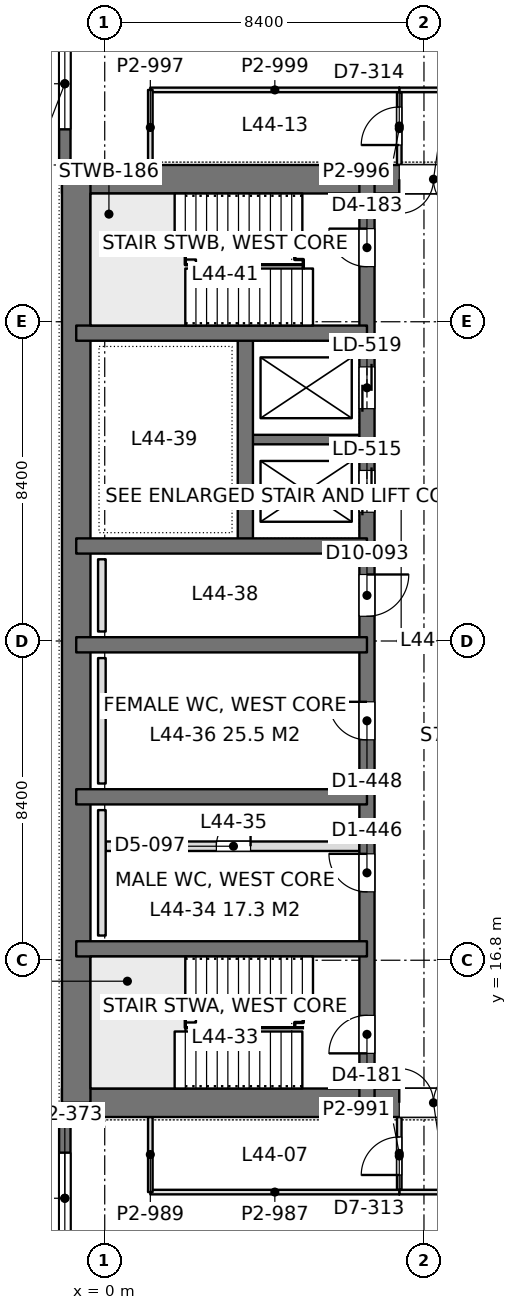
"""IFC4 building model, lengths in metres.
Left out: names, types, materials, properties, quantities, classifications, styles, units other than length and angle.
Written with IfcOpenShell. Run it as: python <this file> out.ifc"""

import sys

from ifc_helpers import new_model, si_unit, direction, frame, frame_2d, origin, place, context, subcontext, project, spatial, rectangle, extrude, element, fill, save


model = new_model("IFC4")
c1 = context("Model", 3, precision=1e-05, world=origin(), true_north=direction((0.0, 1.0)))
c2 = subcontext(c1, "Body", "Model", "MODEL_VIEW")
j1 = project(units=[si_unit("LENGTHUNIT", "METRE"), si_unit("PLANEANGLEUNIT", "RADIAN")], contexts=[c1])
p1 = place(None, origin())
s1 = spatial("IfcSite", under=j1, at=p1, CompositionType="ELEMENT")
p2 = place(p1, origin())
s2 = spatial("IfcBuilding", under=s1, at=p2, CompositionType="ELEMENT")
p3 = place(p2, frame((0.0, 0.0, 194.4)))
s3 = spatial("IfcBuildingStorey", under=s2, at=p3, CompositionType="ELEMENT", Elevation=194.4)
p4 = place(p3, frame((-1.125, 13.05, 0.0), z_axis=(0.0, 0.0, 1.0), x_axis=(1.0, 0.0, 0.0)))
e1 = element("IfcWall", 1, at=p4, inside=s3, PredefinedType="SHEAR", context=c2, shape_type="SweptSolid", body=[
    extrude(rectangle(XDim=17.85, YDim=0.75, at=frame_2d((8.925, 0.0))), origin(), (0.0, 0.0, 1.0), 4.2),
])
p5 = place(p4, frame((8.875, 0.0, 0.0)))
e2 = element("IfcOpeningElement", 2, at=p5, cuts=e1, PredefinedType="OPENING", context=c2, shape_type="SweptSolid", body=[
    extrude(rectangle(XDim=1.8, YDim=2.4, at=frame_2d((0.9, 1.2))), frame((0.0, 0.385, 0.0), z_axis=(0.0, -1.0, 0.0), x_axis=(1.0, 0.0, 0.0)), (0.0, 0.0, 1.0), 0.77),
])
p6 = place(p3, frame((-1.125, 37.35, 0.0), z_axis=(0.0, 0.0, 1.0), x_axis=(1.0, 0.0, 0.0)))
e3 = element("IfcWall", 3, at=p6, inside=s3, PredefinedType="SHEAR", context=c2, shape_type="SweptSolid", body=[
    extrude(rectangle(XDim=17.85, YDim=0.75, at=frame_2d((8.925, 0.0))), origin(), (0.0, 0.0, 1.0), 4.2),
])
p7 = place(p6, frame((8.875, 0.0, 0.0)))
e4 = element("IfcOpeningElement", 4, at=p7, cuts=e3, PredefinedType="OPENING", context=c2, shape_type="SweptSolid", body=[
    extrude(rectangle(XDim=1.8, YDim=2.4, at=frame_2d((0.9, 1.2))), frame((0.0, 0.385, 0.0), z_axis=(0.0, -1.0, 0.0), x_axis=(1.0, 0.0, 0.0)), (0.0, 0.0, 1.0), 0.77),
])
p8 = place(p3, frame((-0.75, 13.05, 0.0), z_axis=(0.0, 0.0, 1.0), x_axis=(0.0, 1.0, 0.0)))
e5 = element("IfcWall", 5, at=p8, inside=s3, PredefinedType="SHEAR", context=c2, shape_type="SweptSolid", body=[
    extrude(rectangle(XDim=24.3, YDim=0.75, at=frame_2d((12.15, 0.0))), origin(), (0.0, 0.0, 1.0), 4.2),
])
p9 = place(p3, frame((6.9, 13.05, 0.0), z_axis=(0.0, 0.0, 1.0), x_axis=(0.0, 1.0, 0.0)))
e6 = element("IfcWall", 6, at=p9, inside=s3, PredefinedType="SHEAR", context=c2, shape_type="SweptSolid", body=[
    extrude(rectangle(XDim=24.3, YDim=0.4, at=frame_2d((12.15, 0.0))), origin(), (0.0, 0.0, 1.0), 4.2),
])
p10 = place(p9, frame((1.3, 0.0, 0.0)))
e7 = element("IfcOpeningElement", 7, at=p10, cuts=e6, PredefinedType="OPENING", context=c2, shape_type="SweptSolid", body=[
    extrude(rectangle(XDim=1.0, YDim=2.2, at=frame_2d((0.5, 1.1))), frame((0.0, 0.21, 0.0), z_axis=(0.0, -1.0, 0.0), x_axis=(1.0, 0.0, 0.0)), (0.0, 0.0, 1.0), 0.42),
])
p11 = place(p9, frame((22.0, 0.0, 0.0)))
e8 = element("IfcOpeningElement", 8, at=p11, cuts=e6, PredefinedType="OPENING", context=c2, shape_type="SweptSolid", body=[
    extrude(rectangle(XDim=1.0, YDim=2.2, at=frame_2d((0.5, 1.1))), frame((0.0, 0.21, 0.0), z_axis=(0.0, -1.0, 0.0), x_axis=(1.0, 0.0, 0.0)), (0.0, 0.0, 1.0), 0.42),
])
p12 = place(p9, frame((5.55, 0.0, 0.0)))
e9 = element("IfcOpeningElement", 9, at=p12, cuts=e6, PredefinedType="OPENING", context=c2, shape_type="SweptSolid", body=[
    extrude(rectangle(XDim=1.0, YDim=2.2, at=frame_2d((0.5, 1.1))), frame((0.0, 0.21, 0.0), z_axis=(0.0, -1.0, 0.0), x_axis=(1.0, 0.0, 0.0)), (0.0, 0.0, 1.0), 0.42),
])
p13 = place(p9, frame((9.55, 0.0, 0.0)))
e10 = element("IfcOpeningElement", 10, at=p13, cuts=e6, PredefinedType="OPENING", context=c2, shape_type="SweptSolid", body=[
    extrude(rectangle(XDim=1.0, YDim=2.2, at=frame_2d((0.5, 1.1))), frame((0.0, 0.21, 0.0), z_axis=(0.0, -1.0, 0.0), x_axis=(1.0, 0.0, 0.0)), (0.0, 0.0, 1.0), 0.42),
])
p14 = place(p9, frame((12.8, 0.0, 0.0)))
e11 = element("IfcOpeningElement", 11, at=p14, cuts=e6, PredefinedType="OPENING", context=c2, shape_type="SweptSolid", body=[
    extrude(rectangle(XDim=1.1, YDim=2.2, at=frame_2d((0.55, 1.1))), frame((0.0, 0.21, 0.0), z_axis=(0.0, -1.0, 0.0), x_axis=(1.0, 0.0, 0.0)), (0.0, 0.0, 1.0), 0.42),
])
p15 = place(p9, frame((15.538, 0.0, 0.0)))
e12 = element("IfcOpeningElement", 12, at=p15, cuts=e6, PredefinedType="OPENING", context=c2, shape_type="SweptSolid", body=[
    extrude(rectangle(XDim=1.1, YDim=2.2, at=frame_2d((0.55, 1.1))), frame((0.0, 0.21, 0.0), z_axis=(0.0, -1.0, 0.0), x_axis=(1.0, 0.0, 0.0)), (0.0, 0.0, 1.0), 0.42),
])
p16 = place(p9, frame((18.262, 0.0, 0.0)))
e13 = element("IfcOpeningElement", 13, at=p16, cuts=e6, PredefinedType="OPENING", context=c2, shape_type="SweptSolid", body=[
    extrude(rectangle(XDim=1.1, YDim=2.2, at=frame_2d((0.55, 1.1))), frame((0.0, 0.21, 0.0), z_axis=(0.0, -1.0, 0.0), x_axis=(1.0, 0.0, 0.0)), (0.0, 0.0, 1.0), 0.42),
])
for number, where, z_axis, x_axis in (
    (14, (-0.75, 17.1, 0.0), (0.0, 0.0, 1.0), (1.0, 0.0, 0.0)),
    (15, (-0.75, 21.1, 0.0), (0.0, 0.0, 1.0), (1.0, 0.0, 0.0)),
    (16, (-0.75, 25.1, 0.0), (0.0, 0.0, 1.0), (1.0, 0.0, 0.0)),
    (17, (-0.75, 27.7, 0.0), (0.0, 0.0, 1.0), (1.0, 0.0, 0.0)),
    (18, (-0.75, 33.3, 0.0), (0.0, 0.0, 1.0), (1.0, 0.0, 0.0)),
):
    element("IfcWall", number, at=place(p3, frame(where, z_axis=z_axis, x_axis=x_axis)), inside=s3, PredefinedType="SHEAR", context=c2, shape_type="SweptSolid", body=[
        extrude(rectangle(XDim=7.65, YDim=0.4, at=frame_2d((3.825, 0.0))), origin(), (0.0, 0.0, 1.0), 4.2),
    ])
p17 = place(p3, frame((3.7, 27.7, 0.0), z_axis=(0.0, 0.0, 1.0), x_axis=(0.0, 1.0, 0.0)))
e19 = element("IfcWall", 19, at=p17, inside=s3, PredefinedType="SHEAR", context=c2, shape_type="SweptSolid", body=[
    extrude(rectangle(XDim=5.6, YDim=0.4, at=frame_2d((2.8, 0.0))), origin(), (0.0, 0.0, 1.0), 4.2),
])
p18 = place(p3, frame((3.7, 30.5, 0.0), z_axis=(0.0, 0.0, 1.0), x_axis=(1.0, 0.0, 0.0)))
e20 = element("IfcWall", 20, at=p18, inside=s3, PredefinedType="SHEAR", context=c2, shape_type="SweptSolid", body=[
    extrude(rectangle(XDim=3.2, YDim=0.25, at=frame_2d((1.6, 0.0))), origin(), (0.0, 0.0, 1.0), 4.2),
])
p19 = place(p3, frame((-1.05, 8.4, 0.0), z_axis=(0.0, 0.0, 1.0), x_axis=(0.0, 1.0, 0.0)))
e21 = element("IfcWall", 21, at=p19, inside=s3, PredefinedType="SOLIDWALL", context=c2, shape_type="SweptSolid", body=[
    extrude(rectangle(XDim=4.275, YDim=0.3, at=frame_2d((2.138, 0.0))), origin(), (0.0, 0.0, 1.0), 4.05),
])
p20 = place(p19, frame((0.938, 0.0, 0.9)))
e22 = element("IfcOpeningElement", 22, at=p20, cuts=e21, PredefinedType="OPENING", context=c2, shape_type="SweptSolid", body=[
    extrude(rectangle(XDim=2.4, YDim=1.9, at=frame_2d((1.2, 0.95))), frame((0.0, 0.16, 0.0), z_axis=(0.0, -1.0, 0.0), x_axis=(1.0, 0.0, 0.0)), (0.0, 0.0, 1.0), 0.32),
])
p21 = place(p3, frame((-1.05, 37.725, 0.0), z_axis=(0.0, 0.0, 1.0), x_axis=(0.0, 1.0, 0.0)))
e23 = element("IfcWall", 23, at=p21, inside=s3, PredefinedType="SOLIDWALL", context=c2, shape_type="SweptSolid", body=[
    extrude(rectangle(XDim=4.275, YDim=0.3, at=frame_2d((2.137, 0.0))), origin(), (0.0, 0.0, 1.0), 4.05),
])
p22 = place(p21, frame((0.938, 0.0, 0.9)))
e24 = element("IfcOpeningElement", 24, at=p22, cuts=e23, PredefinedType="OPENING", context=c2, shape_type="SweptSolid", body=[
    extrude(rectangle(XDim=2.4, YDim=1.9, at=frame_2d((1.2, 0.95))), frame((0.0, 0.16, 0.0), z_axis=(0.0, -1.0, 0.0), x_axis=(1.0, 0.0, 0.0)), (0.0, 0.0, 1.0), 0.32),
])
p23 = place(p3, frame((7.748, 10.7, 0.0), z_axis=(0.0, 0.0, 1.0), x_axis=(1.0, 0.0, 0.0)))
e25 = element("IfcWall", 25, at=p23, inside=s3, PredefinedType="PARTITIONING", context=c2, shape_type="SweptSolid", body=[
    extrude(rectangle(XDim=41.452, YDim=0.12, at=frame_2d((20.726, 0.0))), origin(), (0.0, 0.0, 1.0), 3.55),
])
p24 = place(p23, frame((4.919, 0.0, 0.0)))
e26 = element("IfcOpeningElement", 26, at=p24, cuts=e25, PredefinedType="OPENING", context=c2, shape_type="SweptSolid", body=[
    extrude(rectangle(XDim=1.8, YDim=2.2, at=frame_2d((0.9, 1.1))), frame((0.0, 0.07, 0.0), z_axis=(0.0, -1.0, 0.0), x_axis=(1.0, 0.0, 0.0)), (0.0, 0.0, 1.0), 0.14),
])
p25 = place(p23, frame((10.735, 0.0, 0.0)))
e27 = element("IfcOpeningElement", 27, at=p25, cuts=e25, PredefinedType="OPENING", context=c2, shape_type="SweptSolid", body=[
    extrude(rectangle(XDim=1.8, YDim=2.2, at=frame_2d((0.9, 1.1))), frame((0.0, 0.07, 0.0), z_axis=(0.0, -1.0, 0.0), x_axis=(1.0, 0.0, 0.0)), (0.0, 0.0, 1.0), 0.14),
])
p26 = place(p23, frame((24.552, 0.0, 0.0)))
e28 = element("IfcOpeningElement", 28, at=p26, cuts=e25, PredefinedType="OPENING", context=c2, shape_type="SweptSolid", body=[
    extrude(rectangle(XDim=1.8, YDim=2.2, at=frame_2d((0.9, 1.1))), frame((0.0, 0.07, 0.0), z_axis=(0.0, -1.0, 0.0), x_axis=(1.0, 0.0, 0.0)), (0.0, 0.0, 1.0), 0.14),
])
p27 = place(p23, frame((32.552, 0.0, 0.0)))
e29 = element("IfcOpeningElement", 29, at=p27, cuts=e25, PredefinedType="OPENING", context=c2, shape_type="SweptSolid", body=[
    extrude(rectangle(XDim=1.8, YDim=2.2, at=frame_2d((0.9, 1.1))), frame((0.0, 0.07, 0.0), z_axis=(0.0, -1.0, 0.0), x_axis=(1.0, 0.0, 0.0)), (0.0, 0.0, 1.0), 0.14),
])
p28 = place(p3, frame((7.75, 10.758, 0.0), z_axis=(0.0, 0.0, 1.0), x_axis=(0.0, 1.0, 0.0)))
e30 = element("IfcWall", 30, at=p28, inside=s3, PredefinedType="PARTITIONING", context=c2, shape_type="SweptSolid", body=[
    extrude(rectangle(XDim=1.918, YDim=0.12, at=frame_2d((0.959, 0.0))), origin(), (0.0, 0.0, 1.0), 4.05),
])
p29 = place(p28, frame((0.392, 0.0, 0.0)))
e31 = element("IfcOpeningElement", 31, at=p29, cuts=e30, PredefinedType="OPENING", context=c2, shape_type="SweptSolid", body=[
    extrude(rectangle(XDim=1.0, YDim=2.4, at=frame_2d((0.5, 1.2))), frame((0.0, 0.07, 0.0), z_axis=(0.0, -1.0, 0.0), x_axis=(1.0, 0.0, 0.0)), (0.0, 0.0, 1.0), 0.14),
])
p30 = place(p3, frame((1.2, 10.7, 0.0), z_axis=(0.0, 0.0, 1.0), x_axis=(1.0, 0.0, 0.0)))
e32 = element("IfcWall", 32, at=p30, inside=s3, PredefinedType="PARTITIONING", context=c2, shape_type="SweptSolid", body=[
    extrude(rectangle(XDim=6.552, YDim=0.12, at=frame_2d((3.276, 0.0))), origin(), (0.0, 0.0, 1.0), 4.05),
])
p31 = place(p3, frame((1.2, 10.7, 0.0), z_axis=(0.0, 0.0, 1.0), x_axis=(0.0, 1.0, 0.0)))
e33 = element("IfcWall", 33, at=p31, inside=s3, PredefinedType="PARTITIONING", context=c2, shape_type="SweptSolid", body=[
    extrude(rectangle(XDim=1.976, YDim=0.12, at=frame_2d((0.988, 0.0))), origin(), (0.0, 0.0, 1.0), 4.05),
])
p32 = place(p3, frame((7.748, 39.7, 0.0), z_axis=(0.0, 0.0, 1.0), x_axis=(1.0, 0.0, 0.0)))
e34 = element("IfcWall", 34, at=p32, inside=s3, PredefinedType="PARTITIONING", context=c2, shape_type="SweptSolid", body=[
    extrude(rectangle(XDim=41.452, YDim=0.12, at=frame_2d((20.726, 0.0))), origin(), (0.0, 0.0, 1.0), 3.55),
])
p33 = place(p32, frame((4.919, 0.0, 0.0)))
e35 = element("IfcOpeningElement", 35, at=p33, cuts=e34, PredefinedType="OPENING", context=c2, shape_type="SweptSolid", body=[
    extrude(rectangle(XDim=1.8, YDim=2.2, at=frame_2d((0.9, 1.1))), frame((0.0, 0.07, 0.0), z_axis=(0.0, -1.0, 0.0), x_axis=(1.0, 0.0, 0.0)), (0.0, 0.0, 1.0), 0.14),
])
p34 = place(p32, frame((10.735, 0.0, 0.0)))
e36 = element("IfcOpeningElement", 36, at=p34, cuts=e34, PredefinedType="OPENING", context=c2, shape_type="SweptSolid", body=[
    extrude(rectangle(XDim=1.8, YDim=2.2, at=frame_2d((0.9, 1.1))), frame((0.0, 0.07, 0.0), z_axis=(0.0, -1.0, 0.0), x_axis=(1.0, 0.0, 0.0)), (0.0, 0.0, 1.0), 0.14),
])
p35 = place(p32, frame((24.552, 0.0, 0.0)))
e37 = element("IfcOpeningElement", 37, at=p35, cuts=e34, PredefinedType="OPENING", context=c2, shape_type="SweptSolid", body=[
    extrude(rectangle(XDim=1.8, YDim=2.2, at=frame_2d((0.9, 1.1))), frame((0.0, 0.07, 0.0), z_axis=(0.0, -1.0, 0.0), x_axis=(1.0, 0.0, 0.0)), (0.0, 0.0, 1.0), 0.14),
])
p36 = place(p32, frame((32.552, 0.0, 0.0)))
e38 = element("IfcOpeningElement", 38, at=p36, cuts=e34, PredefinedType="OPENING", context=c2, shape_type="SweptSolid", body=[
    extrude(rectangle(XDim=1.8, YDim=2.2, at=frame_2d((0.9, 1.1))), frame((0.0, 0.07, 0.0), z_axis=(0.0, -1.0, 0.0), x_axis=(1.0, 0.0, 0.0)), (0.0, 0.0, 1.0), 0.14),
])
p37 = place(p3, frame((7.75, 37.724, 0.0), z_axis=(0.0, 0.0, 1.0), x_axis=(0.0, 1.0, 0.0)))
e39 = element("IfcWall", 39, at=p37, inside=s3, PredefinedType="PARTITIONING", context=c2, shape_type="SweptSolid", body=[
    extrude(rectangle(XDim=1.918, YDim=0.12, at=frame_2d((0.959, 0.0))), origin(), (0.0, 0.0, 1.0), 4.05),
])
p38 = place(p37, frame((0.526, 0.0, 0.0)))
e40 = element("IfcOpeningElement", 40, at=p38, cuts=e39, PredefinedType="OPENING", context=c2, shape_type="SweptSolid", body=[
    extrude(rectangle(XDim=1.0, YDim=2.4, at=frame_2d((0.5, 1.2))), frame((0.0, 0.07, 0.0), z_axis=(0.0, -1.0, 0.0), x_axis=(1.0, 0.0, 0.0)), (0.0, 0.0, 1.0), 0.14),
])
p39 = place(p3, frame((1.2, 39.7, 0.0), z_axis=(0.0, 0.0, 1.0), x_axis=(1.0, 0.0, 0.0)))
e41 = element("IfcWall", 41, at=p39, inside=s3, PredefinedType="PARTITIONING", context=c2, shape_type="SweptSolid", body=[
    extrude(rectangle(XDim=6.552, YDim=0.12, at=frame_2d((3.276, 0.0))), origin(), (0.0, 0.0, 1.0), 3.69),
])
p40 = place(p3, frame((1.2, 37.724, 0.0), z_axis=(0.0, 0.0, 1.0), x_axis=(0.0, 1.0, 0.0)))
e42 = element("IfcWall", 42, at=p40, inside=s3, PredefinedType="PARTITIONING", context=c2, shape_type="SweptSolid", body=[
    extrude(rectangle(XDim=1.976, YDim=0.12, at=frame_2d((0.988, 0.0))), origin(), (0.0, 0.0, 1.0), 4.05),
])
p41 = place(p3, frame((0.025, 19.8, 0.0), z_axis=(0.0, 0.0, 1.0), x_axis=(1.0, 0.0, 0.0)))
e43 = element("IfcWall", 43, at=p41, inside=s3, PredefinedType="PARTITIONING", context=c2, shape_type="SweptSolid", body=[
    extrude(rectangle(XDim=6.675, YDim=0.25, at=frame_2d((3.337, 0.0))), origin(), (0.0, 0.0, 1.0), 4.0),
])
p42 = place(p41, frame((2.913, 0.0, 0.0)))
e44 = element("IfcOpeningElement", 44, at=p42, cuts=e43, PredefinedType="OPENING", context=c2, shape_type="SweptSolid", body=[
    extrude(rectangle(XDim=0.9, YDim=2.2, at=frame_2d((0.45, 1.1))), frame((0.0, 0.135, 0.0), z_axis=(0.0, -1.0, 0.0), x_axis=(1.0, 0.0, 0.0)), (0.0, 0.0, 1.0), 0.27),
])
for number, where, z_axis, x_axis in (
    (45, (-0.075, 17.45, 0.0), (0.0, 0.0, 1.0), (0.0, 1.0, 0.0)),
    (46, (-0.075, 21.45, 0.0), (0.0, 0.0, 1.0), (0.0, 1.0, 0.0)),
):
    element("IfcWall", number, at=place(p3, frame(where, z_axis=z_axis, x_axis=x_axis)), inside=s3, PredefinedType="PLUMBINGWALL", context=c2, shape_type="SweptSolid", body=[
        extrude(rectangle(XDim=3.3, YDim=0.2, at=frame_2d((1.65, 0.0))), origin(), (0.0, 0.0, 1.0), 1.2),
    ])
p43 = place(p3, frame((-0.075, 25.45, 0.0), z_axis=(0.0, 0.0, 1.0), x_axis=(0.0, 1.0, 0.0)))
e47 = element("IfcWall", 47, at=p43, inside=s3, PredefinedType="PLUMBINGWALL", context=c2, shape_type="SweptSolid", body=[
    extrude(rectangle(XDim=1.9, YDim=0.2, at=frame_2d((0.95, 0.0))), origin(), (0.0, 0.0, 1.0), 1.2),
])
p44 = place(p20, origin())
e48 = element("IfcWindow", 48, at=p44, inside=s3, PartitioningType="SINGLE_PANEL", PredefinedType="WINDOW", context=c2, shape_type="SweptSolid", body=[
    extrude(rectangle(XDim=2.4, YDim=1.9, at=frame_2d((1.2, 0.95))), frame((0.0, 0.03, 0.0), z_axis=(0.0, -1.0, 0.0), x_axis=(1.0, 0.0, 0.0)), (0.0, 0.0, 1.0), 0.06),
])
fill(e22, e48)
p45 = place(p22, origin())
e49 = element("IfcWindow", 49, at=p45, inside=s3, PartitioningType="SINGLE_PANEL", PredefinedType="WINDOW", context=c2, shape_type="SweptSolid", body=[
    extrude(rectangle(XDim=2.4, YDim=1.9, at=frame_2d((1.2, 0.95))), frame((0.0, 0.03, 0.0), z_axis=(0.0, -1.0, 0.0), x_axis=(1.0, 0.0, 0.0)), (0.0, 0.0, 1.0), 0.06),
])
fill(e24, e49)
p46 = place(p5, origin())
e50 = element("IfcDoor", 50, at=p46, inside=s3, OperationType="DOUBLE_DOOR_SINGLE_SWING", PredefinedType="DOOR", context=c2, shape_type="SweptSolid", body=[
    extrude(rectangle(XDim=1.8, YDim=2.4, at=frame_2d((0.9, 1.2))), frame((0.0, 0.025, 0.0), z_axis=(0.0, -1.0, 0.0), x_axis=(1.0, 0.0, 0.0)), (0.0, 0.0, 1.0), 0.05),
])
fill(e2, e50)
p47 = place(p7, frame((1.8, 0.0, 0.0), z_axis=(0.0, 0.0, 1.0), x_axis=(-1.0, 0.0, 0.0)))
e51 = element("IfcDoor", 51, at=p47, inside=s3, OperationType="DOUBLE_DOOR_SINGLE_SWING", PredefinedType="DOOR", context=c2, shape_type="SweptSolid", body=[
    extrude(rectangle(XDim=1.8, YDim=2.4, at=frame_2d((0.9, 1.2))), frame((0.0, 0.025, 0.0), z_axis=(0.0, -1.0, 0.0), x_axis=(1.0, 0.0, 0.0)), (0.0, 0.0, 1.0), 0.05),
])
fill(e4, e51)
p48 = place(p10, origin())
e52 = element("IfcDoor", 52, at=p48, inside=s3, OperationType="SINGLE_SWING_LEFT", PredefinedType="DOOR", context=c2, shape_type="SweptSolid", body=[
    extrude(rectangle(XDim=1.0, YDim=2.2, at=frame_2d((0.5, 1.1))), frame((0.0, 0.025, 0.0), z_axis=(0.0, -1.0, 0.0), x_axis=(1.0, 0.0, 0.0)), (0.0, 0.0, 1.0), 0.05),
])
fill(e7, e52)
p49 = place(p11, origin())
e53 = element("IfcDoor", 53, at=p49, inside=s3, OperationType="SINGLE_SWING_RIGHT", PredefinedType="DOOR", context=c2, shape_type="SweptSolid", body=[
    extrude(rectangle(XDim=1.0, YDim=2.2, at=frame_2d((0.5, 1.1))), frame((0.0, 0.025, 0.0), z_axis=(0.0, -1.0, 0.0), x_axis=(1.0, 0.0, 0.0)), (0.0, 0.0, 1.0), 0.05),
])
fill(e8, e53)
p50 = place(p12, origin())
e54 = element("IfcDoor", 54, at=p50, inside=s3, OperationType="SINGLE_SWING_RIGHT", PredefinedType="DOOR", context=c2, shape_type="SweptSolid", body=[
    extrude(rectangle(XDim=1.0, YDim=2.2, at=frame_2d((0.5, 1.1))), frame((0.0, 0.025, 0.0), z_axis=(0.0, -1.0, 0.0), x_axis=(1.0, 0.0, 0.0)), (0.0, 0.0, 1.0), 0.05),
])
fill(e9, e54)
p51 = place(p13, origin())
e55 = element("IfcDoor", 55, at=p51, inside=s3, OperationType="SINGLE_SWING_RIGHT", PredefinedType="DOOR", context=c2, shape_type="SweptSolid", body=[
    extrude(rectangle(XDim=1.0, YDim=2.2, at=frame_2d((0.5, 1.1))), frame((0.0, 0.025, 0.0), z_axis=(0.0, -1.0, 0.0), x_axis=(1.0, 0.0, 0.0)), (0.0, 0.0, 1.0), 0.05),
])
fill(e10, e55)
p52 = place(p14, frame((1.1, 0.0, 0.0), z_axis=(0.0, 0.0, 1.0), x_axis=(-1.0, 0.0, 0.0)))
e56 = element("IfcDoor", 56, at=p52, inside=s3, OperationType="SINGLE_SWING_LEFT", PredefinedType="DOOR", context=c2, shape_type="SweptSolid", body=[
    extrude(rectangle(XDim=1.1, YDim=2.2, at=frame_2d((0.55, 1.1))), frame((0.0, 0.025, 0.0), z_axis=(0.0, -1.0, 0.0), x_axis=(1.0, 0.0, 0.0)), (0.0, 0.0, 1.0), 0.05),
])
fill(e11, e56)
p53 = place(p15, origin())
e57 = element("IfcDoor", 57, at=p53, inside=s3, OperationType="DOUBLE_DOOR_SLIDING", PredefinedType="DOOR", context=c2, shape_type="SweptSolid", body=[
    extrude(rectangle(XDim=1.1, YDim=2.2, at=frame_2d((0.55, 1.1))), frame((0.0, 0.025, 0.0), z_axis=(0.0, -1.0, 0.0), x_axis=(1.0, 0.0, 0.0)), (0.0, 0.0, 1.0), 0.05),
])
fill(e12, e57)
p54 = place(p16, origin())
e58 = element("IfcDoor", 58, at=p54, inside=s3, OperationType="DOUBLE_DOOR_SLIDING", PredefinedType="DOOR", context=c2, shape_type="SweptSolid", body=[
    extrude(rectangle(XDim=1.1, YDim=2.2, at=frame_2d((0.55, 1.1))), frame((0.0, 0.025, 0.0), z_axis=(0.0, -1.0, 0.0), x_axis=(1.0, 0.0, 0.0)), (0.0, 0.0, 1.0), 0.05),
])
fill(e13, e58)
p55 = place(p29, origin())
e59 = element("IfcDoor", 59, at=p55, inside=s3, OperationType="SINGLE_SWING_LEFT", PredefinedType="DOOR", context=c2, shape_type="SweptSolid", body=[
    extrude(rectangle(XDim=1.0, YDim=2.4, at=frame_2d((0.5, 1.2))), frame((0.0, 0.025, 0.0), z_axis=(0.0, -1.0, 0.0), x_axis=(1.0, 0.0, 0.0)), (0.0, 0.0, 1.0), 0.05),
])
fill(e31, e59)
p56 = place(p38, origin())
e60 = element("IfcDoor", 60, at=p56, inside=s3, OperationType="SINGLE_SWING_LEFT", PredefinedType="DOOR", context=c2, shape_type="SweptSolid", body=[
    extrude(rectangle(XDim=1.0, YDim=2.4, at=frame_2d((0.5, 1.2))), frame((0.0, 0.025, 0.0), z_axis=(0.0, -1.0, 0.0), x_axis=(1.0, 0.0, 0.0)), (0.0, 0.0, 1.0), 0.05),
])
fill(e40, e60)
p57 = place(p42, origin())
e61 = element("IfcDoor", 61, at=p57, inside=s3, OperationType="SINGLE_SWING_RIGHT", PredefinedType="DOOR", context=c2, shape_type="SweptSolid", body=[
    extrude(rectangle(XDim=0.9, YDim=2.2, at=frame_2d((0.45, 1.1))), frame((0.0, 0.025, 0.0), z_axis=(0.0, -1.0, 0.0), x_axis=(1.0, 0.0, 0.0)), (0.0, 0.0, 1.0), 0.05),
])
fill(e44, e61)
save(model, sys.argv[1])
